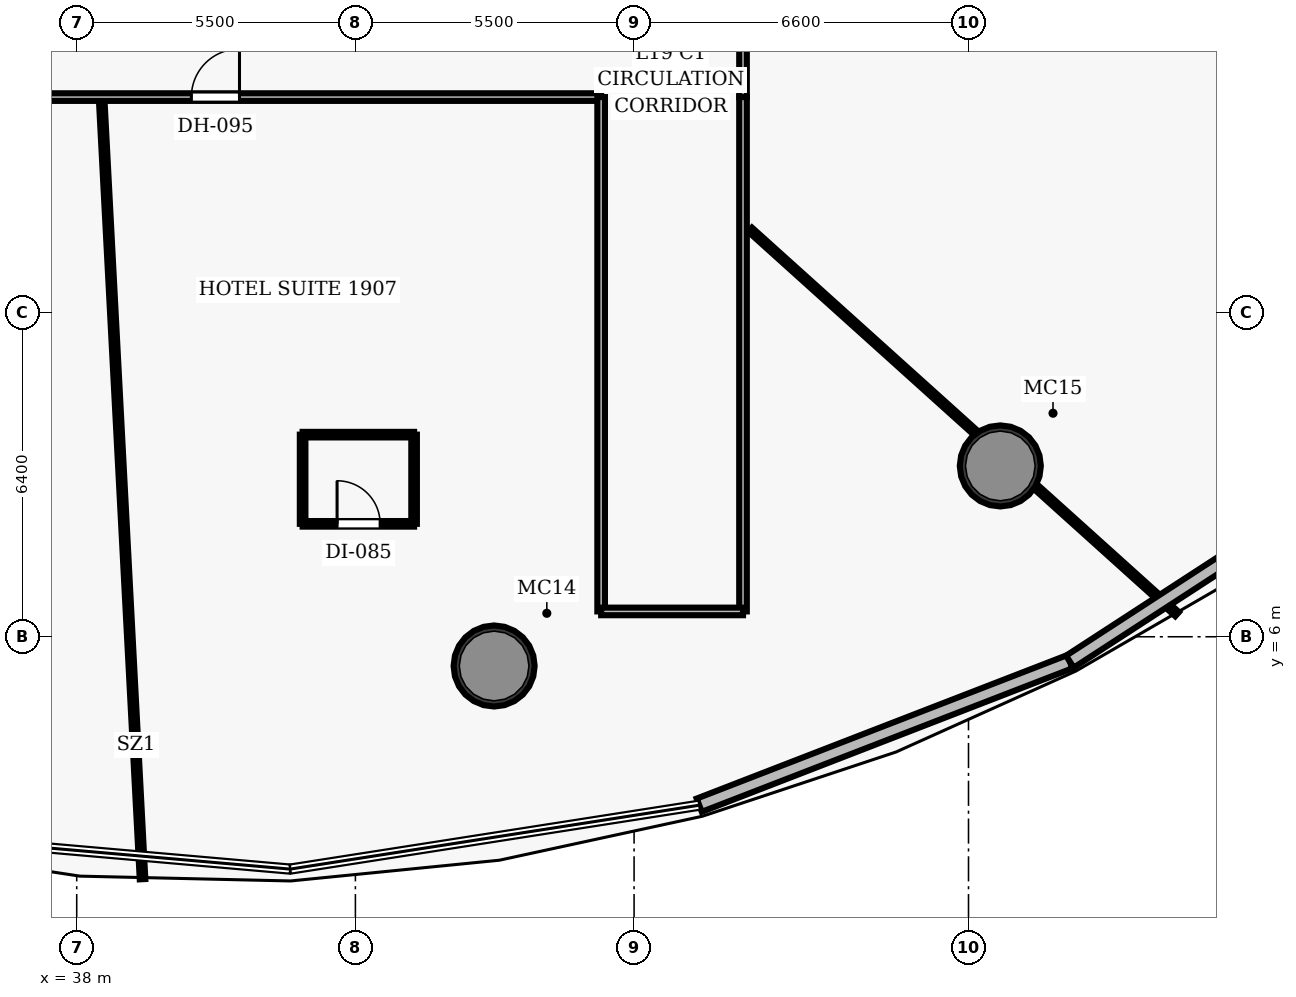
"""IFC4 building model, lengths in metres.
Left out: names, types, materials, properties, quantities, classifications, styles, units other than length and angle.
Written with IfcOpenShell. Run it as: python <this file> out.ifc"""

import sys

from ifc_helpers import new_model, si_unit, direction, frame, frame_2d, origin, origin_2d, place, context, subcontext, project, spatial, rectangle, hollow_circle, extrude, element, fill, save


model = new_model("IFC4")
c1 = context("Model", 3, precision=1e-05, world=origin(), true_north=direction((0.0, 1.0)))
c2 = subcontext(c1, "Body", "Model", "MODEL_VIEW")
j1 = project(units=[si_unit("LENGTHUNIT", "METRE"), si_unit("PLANEANGLEUNIT", "RADIAN")], contexts=[c1])
p1 = place(None, origin())
s1 = spatial("IfcSite", under=j1, at=p1, CompositionType="ELEMENT")
p2 = place(p1, origin())
s2 = spatial("IfcBuilding", under=s1, at=p2, CompositionType="ELEMENT")
p3 = place(p2, frame((0.0, 0.0, 83.4)))
s3 = spatial("IfcBuildingStorey", under=s2, at=p3, CompositionType="ELEMENT", Elevation=83.4)
for number, where, z_axis, x_axis in (
    (1, (46.238, 5.423, 0.0), (0.0, 0.0, 1.0), (1.0, 0.0, 0.0)),
    (2, (56.228, 9.371, 0.0), (0.0, 0.0, 1.0), (1.0, 0.0, 0.0)),
):
    element("IfcColumn", number, at=place(p3, frame(where, z_axis=z_axis, x_axis=x_axis)), inside=s3, PredefinedType="COLUMN", context=c2, shape_type="SweptSolid", body=[
        extrude(hollow_circle(Radius=0.8, WallThickness=0.06, at=origin_2d()), origin(), (0.0, 0.0, 1.0), 3.5),
    ])
p4 = place(p3, frame((24.85, 16.65, 0.0), z_axis=(0.0, 0.0, 1.0), x_axis=(1.0, 0.0, 0.0)))
e3 = element("IfcWall", 3, at=p4, inside=s3, PredefinedType="PARTITIONING", context=c2, shape_type="SweptSolid", body=[
    extrude(rectangle(XDim=23.5, YDim=0.15, at=frame_2d((11.75, 0.0))), origin(), (0.0, 0.0, 1.0), 2.6),
])
p5 = place(p4, frame((11.057, 0.0, 0.0)))
e4 = element("IfcOpeningElement", 4, at=p5, cuts=e3, PredefinedType="OPENING", context=c2, shape_type="SweptSolid", body=[
    extrude(rectangle(XDim=0.95, YDim=2.15, at=frame_2d((0.475, 1.075))), frame((0.0, 0.085, 0.0), z_axis=(0.0, -1.0, 0.0), x_axis=(1.0, 0.0, 0.0)), (0.0, 0.0, 1.0), 0.17),
])
p6 = place(p4, frame((15.413, 0.0, 0.0)))
e5 = element("IfcOpeningElement", 5, at=p6, cuts=e3, PredefinedType="OPENING", context=c2, shape_type="SweptSolid", body=[
    extrude(rectangle(XDim=0.95, YDim=2.15, at=frame_2d((0.475, 1.075))), frame((0.0, 0.085, 0.0), z_axis=(0.0, -1.0, 0.0), x_axis=(1.0, 0.0, 0.0)), (0.0, 0.0, 1.0), 0.17),
])
p7 = place(p3, frame((51.15, 16.65, 0.0), z_axis=(0.0, 0.0, 1.0), x_axis=(0.0, 1.0, 0.0)))
e6 = element("IfcWall", 6, at=p7, inside=s3, PredefinedType="PARTITIONING", context=c2, shape_type="SweptSolid", body=[
    extrude(rectangle(XDim=15.9, YDim=0.15, at=frame_2d((7.95, 0.0))), origin(), (0.0, 0.0, 1.0), 2.6),
])
p8 = place(p7, frame((10.812, 0.0, 0.0)))
e7 = element("IfcOpeningElement", 7, at=p8, cuts=e6, PredefinedType="OPENING", context=c2, shape_type="SweptSolid", body=[
    extrude(rectangle(XDim=0.95, YDim=2.15, at=frame_2d((0.475, 1.075))), frame((0.0, 0.085, 0.0), z_axis=(0.0, -1.0, 0.0), x_axis=(1.0, 0.0, 0.0)), (0.0, 0.0, 1.0), 0.17),
])
p9 = place(p7, frame((7.281, 0.0, 0.0)))
e8 = element("IfcOpeningElement", 8, at=p9, cuts=e6, PredefinedType="OPENING", context=c2, shape_type="SweptSolid", body=[
    extrude(rectangle(XDim=0.95, YDim=2.15, at=frame_2d((0.475, 1.075))), frame((0.0, 0.085, 0.0), z_axis=(0.0, -1.0, 0.0), x_axis=(1.0, 0.0, 0.0)), (0.0, 0.0, 1.0), 0.17),
])
for number, where, z_axis, x_axis in (
    (9, (48.35, 6.5, 0.0), (0.0, 0.0, 1.0), (0.0, 1.0, 0.0)),
    (10, (51.15, 6.5, 0.0), (0.0, 0.0, 1.0), (0.0, 1.0, 0.0)),
):
    element("IfcWall", number, at=place(p3, frame(where, z_axis=z_axis, x_axis=x_axis)), inside=s3, PredefinedType="PARTITIONING", context=c2, shape_type="SweptSolid", body=[
        extrude(rectangle(XDim=10.15, YDim=0.15, at=frame_2d((5.075, 0.0))), origin(), (0.0, 0.0, 1.0), 2.6),
    ])
p10 = place(p3, frame((48.35, 6.5, 0.0), z_axis=(0.0, 0.0, 1.0), x_axis=(1.0, 0.0, 0.0)))
e11 = element("IfcWall", 11, at=p10, inside=s3, PredefinedType="PARTITIONING", context=c2, shape_type="SweptSolid", body=[
    extrude(rectangle(XDim=2.8, YDim=0.15, at=frame_2d((1.4, 0.0))), origin(), (0.0, 0.0, 1.0), 2.6),
])
p11 = place(p3, frame((38.497, 16.51, 0.0), z_axis=(0.0, 0.0, 1.0), x_axis=(0.052333766551, -0.998629649509, 0.0)))
e12 = element("IfcWall", 12, at=p11, inside=s3, PredefinedType="PARTITIONING", context=c2, shape_type="SweptSolid", body=[
    extrude(rectangle(XDim=15.315, YDim=0.11, at=frame_2d((7.658, 0.0))), origin(), (0.0, 0.0, 1.0), 2.6),
])
p12 = place(p3, frame((51.29, 14.034, 0.0), z_axis=(0.0, 0.0, 1.0), x_axis=(0.743147463393, -0.669127676646, 0.0)))
e13 = element("IfcWall", 13, at=p12, inside=s3, PredefinedType="PARTITIONING", context=c2, shape_type="SweptSolid", body=[
    extrude(rectangle(XDim=11.34, YDim=0.11, at=frame_2d((5.67, 0.0))), origin(), (0.0, 0.0, 1.0), 2.6),
])
p13 = place(p3, frame((42.458, 8.229, 0.0), z_axis=(0.0, 0.0, 1.0), x_axis=(1.0, 0.0, 0.0)))
e14 = element("IfcWall", 14, at=p13, inside=s3, PredefinedType="PARTITIONING", context=c2, shape_type="SweptSolid", body=[
    extrude(rectangle(XDim=2.2, YDim=0.11, at=frame_2d((1.1, 0.0))), origin(), (0.0, 0.0, 1.0), 2.6),
])
p14 = place(p13, frame((0.68, 0.0, 0.0)))
e15 = element("IfcOpeningElement", 15, at=p14, cuts=e14, PredefinedType="OPENING", context=c2, shape_type="SweptSolid", body=[
    extrude(rectangle(XDim=0.85, YDim=2.1, at=frame_2d((0.425, 1.05))), frame((0.0, 0.065, 0.0), z_axis=(0.0, -1.0, 0.0), x_axis=(1.0, 0.0, 0.0)), (0.0, 0.0, 1.0), 0.13),
])
p15 = place(p3, frame((42.458, 9.988, 0.0), z_axis=(0.0, 0.0, 1.0), x_axis=(1.0, 0.0, 0.0)))
e16 = element("IfcWall", 16, at=p15, inside=s3, PredefinedType="PARTITIONING", context=c2, shape_type="SweptSolid", body=[
    extrude(rectangle(XDim=2.2, YDim=0.11, at=frame_2d((1.1, 0.0))), origin(), (0.0, 0.0, 1.0), 2.6),
])
for number, where, z_axis, x_axis in (
    (17, (42.458, 8.229, 0.0), (0.0, 0.0, 1.0), (0.0, 1.0, 0.0)),
    (18, (44.658, 8.229, 0.0), (0.0, 0.0, 1.0), (0.0, 1.0, 0.0)),
):
    element("IfcWall", number, at=place(p3, frame(where, z_axis=z_axis, x_axis=x_axis)), inside=s3, PredefinedType="PARTITIONING", context=c2, shape_type="SweptSolid", body=[
        extrude(rectangle(XDim=1.76, YDim=0.11, at=frame_2d((0.88, 0.0))), origin(), (0.0, 0.0, 1.0), 2.6),
    ])
p16 = place(p3, frame((57.601, 5.508, 0.0), z_axis=(0.0, 0.0, 1.0), x_axis=(-0.932540382357, -0.361065693846, 0.0)))
e19 = element("IfcWall", 19, at=p16, inside=s3, PredefinedType="SOLIDWALL", context=c2, shape_type="SweptSolid", body=[
    extrude(rectangle(XDim=7.845, YDim=0.28, at=frame_2d((3.922, 0.0))), origin(), (0.0, 0.0, 1.0), 3.25),
])
p17 = place(p3, frame((63.591, 9.4, 0.0), z_axis=(0.0, 0.0, 1.0), x_axis=(-0.838544340637, -0.544833358731, 0.0)))
e20 = element("IfcWall", 20, at=p17, inside=s3, PredefinedType="SOLIDWALL", context=c2, shape_type="SweptSolid", body=[
    extrude(rectangle(XDim=7.143, YDim=0.28, at=frame_2d((3.571, 0.0))), origin(), (0.0, 0.0, 1.0), 3.25),
])
p18 = place(p6, origin())
e21 = element("IfcDoor", 21, at=p18, inside=s3, OperationType="SINGLE_SWING_RIGHT", PredefinedType="DOOR", context=c2, shape_type="SweptSolid", body=[
    extrude(rectangle(XDim=0.95, YDim=2.15, at=frame_2d((0.475, 1.075))), frame((0.0, 0.025, 0.0), z_axis=(0.0, -1.0, 0.0), x_axis=(1.0, 0.0, 0.0)), (0.0, 0.0, 1.0), 0.05),
])
fill(e5, e21)
p19 = place(p14, origin())
e22 = element("IfcDoor", 22, at=p19, inside=s3, OperationType="SINGLE_SWING_LEFT", PredefinedType="DOOR", context=c2, shape_type="SweptSolid", body=[
    extrude(rectangle(XDim=0.85, YDim=2.1, at=frame_2d((0.425, 1.05))), frame((0.0, 0.025, 0.0), z_axis=(0.0, -1.0, 0.0), x_axis=(1.0, 0.0, 0.0)), (0.0, 0.0, 1.0), 0.05),
])
fill(e15, e22)
save(model, sys.argv[1])
